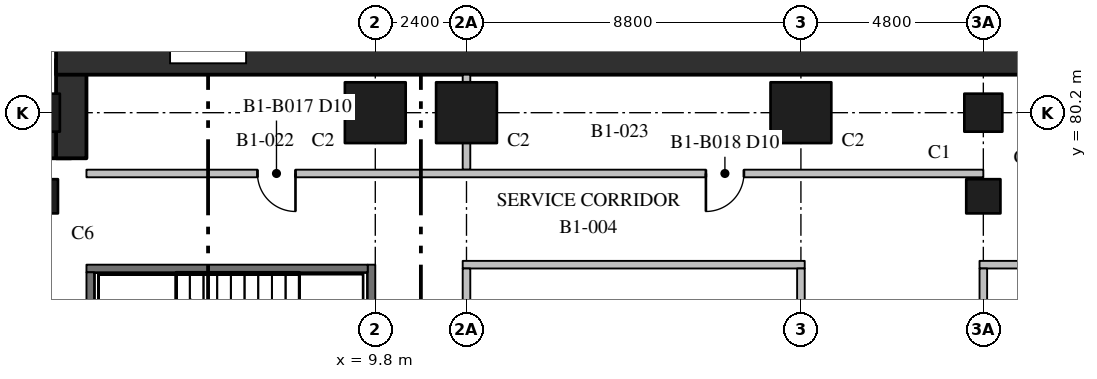
"""IFC4 building model, lengths in metres.
Left out: names, types, materials, properties, quantities, classifications, styles, units other than length and angle.
Written with IfcOpenShell. Run it as: python <this file> out.ifc"""

import sys

from ifc_helpers import new_model, si_unit, direction, frame, frame_2d, origin, origin_2d, place, context, subcontext, project, spatial, rectangle, extrude, element, fill, save


model = new_model("IFC4")
c1 = context("Model", 3, precision=1e-05, world=origin(), true_north=direction((0.0, 1.0)))
c2 = subcontext(c1, "Body", "Model", "MODEL_VIEW")
j1 = project(units=[si_unit("LENGTHUNIT", "METRE"), si_unit("PLANEANGLEUNIT", "RADIAN")], contexts=[c1])
p1 = place(None, origin())
s1 = spatial("IfcSite", under=j1, at=p1, CompositionType="ELEMENT")
p2 = place(p1, origin())
s2 = spatial("IfcBuilding", under=s1, at=p2, CompositionType="ELEMENT")
p3 = place(p2, frame((0.0, 0.0, -7.0)))
s3 = spatial("IfcBuildingStorey", under=s2, at=p3, CompositionType="ELEMENT", Elevation=-7.0)
p4 = place(p3, frame((1.0, 80.2, 0.0), z_axis=(0.0, 0.0, 1.0), x_axis=(1.0, 0.0, 0.0)))
e1 = element("IfcColumn", 1, at=p4, inside=s3, PredefinedType="COLUMN", context=c2, shape_type="SweptSolid", body=[
    extrude(rectangle(XDim=1.0, YDim=1.0, at=origin_2d()), origin(), (0.0, 0.0, 1.0), 7.0),
])
for number, where, z_axis, x_axis in (
    (2, (9.8, 80.2, 0.0), (0.0, 0.0, 1.0), (1.0, 0.0, 0.0)),
    (3, (12.2, 80.2, 0.0), (0.0, 0.0, 1.0), (1.0, 0.0, 0.0)),
    (4, (21.0, 80.2, 0.0), (0.0, 0.0, 1.0), (1.0, 0.0, 0.0)),
):
    element("IfcColumn", number, at=place(p3, frame(where, z_axis=z_axis, x_axis=x_axis)), inside=s3, PredefinedType="COLUMN", context=c2, shape_type="SweptSolid", body=[
        extrude(rectangle(XDim=1.6, YDim=1.6, at=origin_2d()), origin(), (0.0, 0.0, 1.0), 7.0),
    ])
p5 = place(p3, frame((25.8, 80.2, 0.0), z_axis=(0.0, 0.0, 1.0), x_axis=(1.0, 0.0, 0.0)))
e5 = element("IfcColumn", 5, at=p5, inside=s3, PredefinedType="COLUMN", context=c2, shape_type="SweptSolid", body=[
    extrude(rectangle(XDim=1.0, YDim=1.0, at=origin_2d()), origin(), (0.0, 0.0, 1.0), 7.0),
])
for number, where, z_axis, x_axis in (
    (6, (1.0, 78.0, 0.0), (0.0, 0.0, 1.0), (1.0, 0.0, 0.0)),
    (7, (25.8, 78.0, 0.0), (0.0, 0.0, 1.0), (1.0, 0.0, 0.0)),
):
    element("IfcColumn", number, at=place(p3, frame(where, z_axis=z_axis, x_axis=x_axis)), inside=s3, PredefinedType="COLUMN", context=c2, shape_type="SweptSolid", body=[
        extrude(rectangle(XDim=0.9, YDim=0.9, at=origin_2d()), origin(), (0.0, 0.0, 1.0), 7.0),
    ])
for number, where, z_axis, x_axis in (
    (8, (-0.8, 79.4, 0.0), (0.0, 0.0, 1.0), (1.0, 0.0, 0.0)),
    (9, (1.8, 79.0, 0.0), (0.0, 0.0, 1.0), (0.0, 1.0, 0.0)),
):
    element("IfcWall", number, at=place(p3, frame(where, z_axis=z_axis, x_axis=x_axis)), inside=s3, PredefinedType="SHEAR", context=c2, shape_type="SweptSolid", body=[
        extrude(rectangle(XDim=2.6, YDim=0.8, at=frame_2d((1.3, 0.0))), origin(), (0.0, 0.0, 1.0), 7.0),
    ])
p6 = place(p3, frame((1.4, 81.6, 0.0), z_axis=(0.0, 0.0, 1.0), x_axis=(1.0, 0.0, 0.0)))
e10 = element("IfcWall", 10, at=p6, inside=s3, PredefinedType="SHEAR", context=c2, shape_type="SweptSolid", body=[
    extrude(rectangle(XDim=78.0, YDim=0.8, at=frame_2d((39.0, 0.0))), origin(), (0.0, 0.0, 1.0), 7.0),
])
p7 = place(p3, frame((9.7, 71.8, 0.0), z_axis=(0.0, 0.0, 1.0), x_axis=(0.0, 1.0, 0.0)))
e11 = element("IfcWall", 11, at=p7, inside=s3, PredefinedType="SHEAR", context=c2, shape_type="SweptSolid", body=[
    extrude(rectangle(XDim=4.4, YDim=0.2, at=frame_2d((2.2, 0.0))), origin(), (0.0, 0.0, 1.0), 6.55),
])
p8 = place(p7, frame((1.6, 0.0, 0.0)))
e12 = element("IfcOpeningElement", 12, at=p8, cuts=e11, PredefinedType="OPENING", context=c2, shape_type="SweptSolid", body=[
    extrude(rectangle(XDim=1.2, YDim=2.1, at=frame_2d((0.6, 1.05))), frame((0.0, 0.11, 0.0), z_axis=(0.0, -1.0, 0.0), x_axis=(1.0, 0.0, 0.0)), (0.0, 0.0, 1.0), 0.22),
])
p9 = place(p3, frame((2.2, 76.1, 0.0), z_axis=(0.0, 0.0, 1.0), x_axis=(1.0, 0.0, 0.0)))
e13 = element("IfcWall", 13, at=p9, inside=s3, PredefinedType="SHEAR", context=c2, shape_type="SweptSolid", body=[
    extrude(rectangle(XDim=7.4, YDim=0.2, at=frame_2d((3.7, 0.0))), origin(), (0.0, 0.0, 1.0), 6.55),
])
p10 = place(p3, frame((2.3, 72.0, 0.0), z_axis=(0.0, 0.0, 1.0), x_axis=(0.0, 1.0, 0.0)))
e14 = element("IfcWall", 14, at=p10, inside=s3, PredefinedType="SHEAR", context=c2, shape_type="SweptSolid", body=[
    extrude(rectangle(XDim=4.0, YDim=0.2, at=frame_2d((2.0, 0.0))), origin(), (0.0, 0.0, 1.0), 6.55),
])
p11 = place(p3, frame((12.1, 76.2, 0.0), z_axis=(0.0, 0.0, 1.0), x_axis=(1.0, 0.0, 0.0)))
e15 = element("IfcWall", 15, at=p11, inside=s3, PredefinedType="PARTITIONING", context=c2, shape_type="SweptSolid", body=[
    extrude(rectangle(XDim=9.0, YDim=0.2, at=frame_2d((4.5, 0.0))), origin(), (0.0, 0.0, 1.0), 6.5),
])
p12 = place(p3, frame((25.7, 76.2, 0.0), z_axis=(0.0, 0.0, 1.0), x_axis=(1.0, 0.0, 0.0)))
e16 = element("IfcWall", 16, at=p12, inside=s3, PredefinedType="PARTITIONING", context=c2, shape_type="SweptSolid", body=[
    extrude(rectangle(XDim=15.4, YDim=0.2, at=frame_2d((7.7, 0.0))), origin(), (0.0, 0.0, 1.0), 6.5),
])
p13 = place(p12, frame((12.7, 0.0, 0.0)))
e17 = element("IfcOpeningElement", 17, at=p13, cuts=e16, PredefinedType="OPENING", context=c2, shape_type="SweptSolid", body=[
    extrude(rectangle(XDim=1.0, YDim=2.1, at=frame_2d((0.5, 1.05))), frame((0.0, 0.11, 0.0), z_axis=(0.0, -1.0, 0.0), x_axis=(1.0, 0.0, 0.0)), (0.0, 0.0, 1.0), 0.22),
])
p14 = place(p3, frame((2.2, 78.6, 0.0), z_axis=(0.0, 0.0, 1.0), x_axis=(1.0, 0.0, 0.0)))
e18 = element("IfcWall", 18, at=p14, inside=s3, PredefinedType="PARTITIONING", context=c2, shape_type="SweptSolid", body=[
    extrude(rectangle(XDim=23.6, YDim=0.2, at=frame_2d((11.8, 0.0))), origin(), (0.0, 0.0, 1.0), 6.5),
])
p15 = place(p14, frame((4.5, 0.0, 0.0)))
e19 = element("IfcOpeningElement", 19, at=p15, cuts=e18, PredefinedType="OPENING", context=c2, shape_type="SweptSolid", body=[
    extrude(rectangle(XDim=1.0, YDim=2.1, at=frame_2d((0.5, 1.05))), frame((0.0, 0.11, 0.0), z_axis=(0.0, -1.0, 0.0), x_axis=(1.0, 0.0, 0.0)), (0.0, 0.0, 1.0), 0.22),
])
p16 = place(p14, frame((16.3, 0.0, 0.0)))
e20 = element("IfcOpeningElement", 20, at=p16, cuts=e18, PredefinedType="OPENING", context=c2, shape_type="SweptSolid", body=[
    extrude(rectangle(XDim=1.0, YDim=2.1, at=frame_2d((0.5, 1.05))), frame((0.0, 0.11, 0.0), z_axis=(0.0, -1.0, 0.0), x_axis=(1.0, 0.0, 0.0)), (0.0, 0.0, 1.0), 0.22),
])
p17 = place(p3, frame((12.2, 12.3, 0.0), z_axis=(0.0, 0.0, 1.0), x_axis=(0.0, 1.0, 0.0)))
e21 = element("IfcWall", 21, at=p17, inside=s3, PredefinedType="PARTITIONING", context=c2, shape_type="SweptSolid", body=[
    extrude(rectangle(XDim=63.8, YDim=0.2, at=frame_2d((31.9, 0.0))), origin(), (0.0, 0.0, 1.0), 6.5),
])
p18 = place(p17, frame((4.3, 0.0, 0.0)))
e22 = element("IfcOpeningElement", 22, at=p18, cuts=e21, PredefinedType="OPENING", context=c2, shape_type="SweptSolid", body=[
    extrude(rectangle(XDim=1.0, YDim=2.1, at=frame_2d((0.5, 1.05))), frame((0.0, 0.11, 0.0), z_axis=(0.0, -1.0, 0.0), x_axis=(1.0, 0.0, 0.0)), (0.0, 0.0, 1.0), 0.22),
])
p19 = place(p17, frame((11.8, 0.0, 0.0)))
e23 = element("IfcOpeningElement", 23, at=p19, cuts=e21, PredefinedType="OPENING", context=c2, shape_type="SweptSolid", body=[
    extrude(rectangle(XDim=1.0, YDim=2.1, at=frame_2d((0.5, 1.05))), frame((0.0, 0.11, 0.0), z_axis=(0.0, -1.0, 0.0), x_axis=(1.0, 0.0, 0.0)), (0.0, 0.0, 1.0), 0.22),
])
p20 = place(p17, frame((19.5, 0.0, 0.0)))
e24 = element("IfcOpeningElement", 24, at=p20, cuts=e21, PredefinedType="OPENING", context=c2, shape_type="SweptSolid", body=[
    extrude(rectangle(XDim=1.0, YDim=2.1, at=frame_2d((0.5, 1.05))), frame((0.0, 0.11, 0.0), z_axis=(0.0, -1.0, 0.0), x_axis=(1.0, 0.0, 0.0)), (0.0, 0.0, 1.0), 0.22),
])
p21 = place(p17, frame((28.0, 0.0, 0.0)))
e25 = element("IfcOpeningElement", 25, at=p21, cuts=e21, PredefinedType="OPENING", context=c2, shape_type="SweptSolid", body=[
    extrude(rectangle(XDim=1.0, YDim=2.1, at=frame_2d((0.5, 1.05))), frame((0.0, 0.11, 0.0), z_axis=(0.0, -1.0, 0.0), x_axis=(1.0, 0.0, 0.0)), (0.0, 0.0, 1.0), 0.22),
])
p22 = place(p17, frame((36.9, 0.0, 0.0)))
e26 = element("IfcOpeningElement", 26, at=p22, cuts=e21, PredefinedType="OPENING", context=c2, shape_type="SweptSolid", body=[
    extrude(rectangle(XDim=1.0, YDim=2.1, at=frame_2d((0.5, 1.05))), frame((0.0, 0.11, 0.0), z_axis=(0.0, -1.0, 0.0), x_axis=(1.0, 0.0, 0.0)), (0.0, 0.0, 1.0), 0.22),
])
p23 = place(p17, frame((46.1, 0.0, 0.0)))
e27 = element("IfcOpeningElement", 27, at=p23, cuts=e21, PredefinedType="OPENING", context=c2, shape_type="SweptSolid", body=[
    extrude(rectangle(XDim=1.0, YDim=2.1, at=frame_2d((0.5, 1.05))), frame((0.0, 0.11, 0.0), z_axis=(0.0, -1.0, 0.0), x_axis=(1.0, 0.0, 0.0)), (0.0, 0.0, 1.0), 0.22),
])
p24 = place(p17, frame((54.2, 0.0, 0.0)))
e28 = element("IfcOpeningElement", 28, at=p24, cuts=e21, PredefinedType="OPENING", context=c2, shape_type="SweptSolid", body=[
    extrude(rectangle(XDim=1.0, YDim=2.1, at=frame_2d((0.5, 1.05))), frame((0.0, 0.11, 0.0), z_axis=(0.0, -1.0, 0.0), x_axis=(1.0, 0.0, 0.0)), (0.0, 0.0, 1.0), 0.22),
])
p25 = place(p17, frame((61.0, 0.0, 0.0)))
e29 = element("IfcOpeningElement", 29, at=p25, cuts=e21, PredefinedType="OPENING", context=c2, shape_type="SweptSolid", body=[
    extrude(rectangle(XDim=1.0, YDim=2.1, at=frame_2d((0.5, 1.05))), frame((0.0, 0.11, 0.0), z_axis=(0.0, -1.0, 0.0), x_axis=(1.0, 0.0, 0.0)), (0.0, 0.0, 1.0), 0.22),
])
p26 = place(p3, frame((12.2, 78.7, 0.0), z_axis=(0.0, 0.0, 1.0), x_axis=(0.0, 1.0, 0.0)))
e30 = element("IfcWall", 30, at=p26, inside=s3, PredefinedType="PARTITIONING", context=c2, shape_type="SweptSolid", body=[
    extrude(rectangle(XDim=2.5, YDim=0.2, at=frame_2d((1.25, 0.0))), origin(), (0.0, 0.0, 1.0), 6.5),
])
p27 = place(p3, frame((21.0, 12.3, 0.0), z_axis=(0.0, 0.0, 1.0), x_axis=(0.0, 1.0, 0.0)))
e31 = element("IfcWall", 31, at=p27, inside=s3, PredefinedType="PARTITIONING", context=c2, shape_type="SweptSolid", body=[
    extrude(rectangle(XDim=63.8, YDim=0.2, at=frame_2d((31.9, 0.0))), origin(), (0.0, 0.0, 1.0), 6.5),
])
p28 = place(p3, frame((25.8, 12.3, 0.0), z_axis=(0.0, 0.0, 1.0), x_axis=(0.0, 1.0, 0.0)))
e32 = element("IfcWall", 32, at=p28, inside=s3, PredefinedType="PARTITIONING", context=c2, shape_type="SweptSolid", body=[
    extrude(rectangle(XDim=63.8, YDim=0.2, at=frame_2d((31.9, 0.0))), origin(), (0.0, 0.0, 1.0), 6.5),
])
p29 = place(p28, frame((18.3, 0.0, 0.0)))
e33 = element("IfcOpeningElement", 33, at=p29, cuts=e32, PredefinedType="OPENING", context=c2, shape_type="SweptSolid", body=[
    extrude(rectangle(XDim=1.8, YDim=2.1, at=frame_2d((0.9, 1.05))), frame((0.0, 0.11, 0.0), z_axis=(0.0, -1.0, 0.0), x_axis=(1.0, 0.0, 0.0)), (0.0, 0.0, 1.0), 0.22),
])
p30 = place(p28, frame((27.4, 0.0, 0.0)))
e34 = element("IfcOpeningElement", 34, at=p30, cuts=e32, PredefinedType="OPENING", context=c2, shape_type="SweptSolid", body=[
    extrude(rectangle(XDim=1.8, YDim=2.1, at=frame_2d((0.9, 1.05))), frame((0.0, 0.11, 0.0), z_axis=(0.0, -1.0, 0.0), x_axis=(1.0, 0.0, 0.0)), (0.0, 0.0, 1.0), 0.22),
])
p31 = place(p28, frame((36.2, 0.0, 0.0)))
e35 = element("IfcOpeningElement", 35, at=p31, cuts=e32, PredefinedType="OPENING", context=c2, shape_type="SweptSolid", body=[
    extrude(rectangle(XDim=1.8, YDim=2.1, at=frame_2d((0.9, 1.05))), frame((0.0, 0.11, 0.0), z_axis=(0.0, -1.0, 0.0), x_axis=(1.0, 0.0, 0.0)), (0.0, 0.0, 1.0), 0.22),
])
p32 = place(p28, frame((42.9, 0.0, 0.0)))
e36 = element("IfcOpeningElement", 36, at=p32, cuts=e32, PredefinedType="OPENING", context=c2, shape_type="SweptSolid", body=[
    extrude(rectangle(XDim=1.0, YDim=2.1, at=frame_2d((0.5, 1.05))), frame((0.0, 0.11, 0.0), z_axis=(0.0, -1.0, 0.0), x_axis=(1.0, 0.0, 0.0)), (0.0, 0.0, 1.0), 0.22),
])
p33 = place(p28, frame((51.2, 0.0, 0.0)))
e37 = element("IfcOpeningElement", 37, at=p33, cuts=e32, PredefinedType="OPENING", context=c2, shape_type="SweptSolid", body=[
    extrude(rectangle(XDim=1.8, YDim=2.1, at=frame_2d((0.9, 1.05))), frame((0.0, 0.11, 0.0), z_axis=(0.0, -1.0, 0.0), x_axis=(1.0, 0.0, 0.0)), (0.0, 0.0, 1.0), 0.22),
])
p34 = place(p28, frame((60.5, 0.0, 0.0)))
e38 = element("IfcOpeningElement", 38, at=p34, cuts=e32, PredefinedType="OPENING", context=c2, shape_type="SweptSolid", body=[
    extrude(rectangle(XDim=1.0, YDim=2.1, at=frame_2d((0.5, 1.05))), frame((0.0, 0.11, 0.0), z_axis=(0.0, -1.0, 0.0), x_axis=(1.0, 0.0, 0.0)), (0.0, 0.0, 1.0), 0.22),
])
p35 = place(p15, frame((1.0, 0.0, 0.0), z_axis=(0.0, 0.0, 1.0), x_axis=(-1.0, 0.0, 0.0)))
e39 = element("IfcDoor", 39, at=p35, inside=s3, OperationType="SINGLE_SWING_RIGHT", PredefinedType="DOOR", context=c2, shape_type="SweptSolid", body=[
    extrude(rectangle(XDim=1.0, YDim=2.1, at=frame_2d((0.5, 1.05))), frame((0.0, 0.025, 0.0), z_axis=(0.0, -1.0, 0.0), x_axis=(1.0, 0.0, 0.0)), (0.0, 0.0, 1.0), 0.05),
])
fill(e19, e39)
p36 = place(p16, frame((1.0, 0.0, 0.0), z_axis=(0.0, 0.0, 1.0), x_axis=(-1.0, 0.0, 0.0)))
e40 = element("IfcDoor", 40, at=p36, inside=s3, OperationType="SINGLE_SWING_LEFT", PredefinedType="DOOR", context=c2, shape_type="SweptSolid", body=[
    extrude(rectangle(XDim=1.0, YDim=2.1, at=frame_2d((0.5, 1.05))), frame((0.0, 0.025, 0.0), z_axis=(0.0, -1.0, 0.0), x_axis=(1.0, 0.0, 0.0)), (0.0, 0.0, 1.0), 0.05),
])
fill(e20, e40)
save(model, sys.argv[1])
